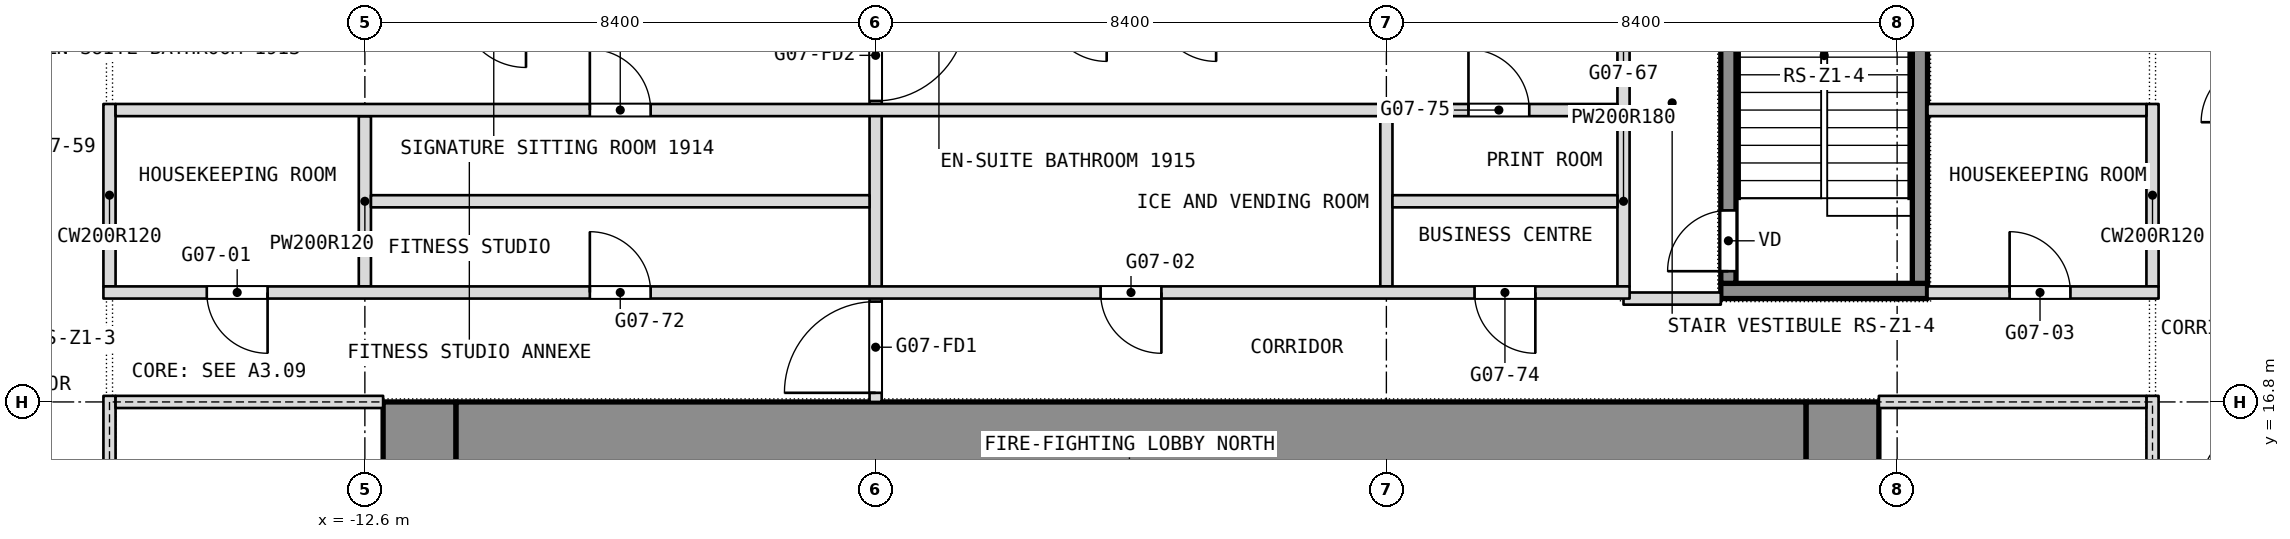
"""IFC4 building model, lengths in metres.
Left out: names, types, materials, properties, quantities, classifications, styles, units other than length and angle.
Written with IfcOpenShell. Run it as: python <this file> out.ifc"""

import sys

from ifc_helpers import new_model, si_unit, direction, frame, frame_2d, origin, place, context, subcontext, project, spatial, rectangle, extrude, element, fill, save


model = new_model("IFC4")
c1 = context("Model", 3, precision=1e-05, world=origin(), true_north=direction((0.0, 1.0)))
c2 = subcontext(c1, "Body", "Model", "MODEL_VIEW")
j1 = project(units=[si_unit("LENGTHUNIT", "METRE"), si_unit("PLANEANGLEUNIT", "RADIAN")], contexts=[c1])
p1 = place(None, origin())
s1 = spatial("IfcSite", under=j1, at=p1, CompositionType="ELEMENT")
p2 = place(p1, origin())
s2 = spatial("IfcBuilding", under=s1, at=p2, CompositionType="ELEMENT")
p3 = place(p2, frame((0.0, 0.0, 83.3)))
s3 = spatial("IfcBuildingStorey", under=s2, at=p3, CompositionType="ELEMENT", Elevation=83.3)
p4 = place(p3, frame((11.7, 0.0, 0.0), z_axis=(0.0, 0.0, 1.0), x_axis=(0.0, 1.0, 0.0)))
e1 = element("IfcWall", 1, at=p4, inside=s3, PredefinedType="SHEAR", context=c2, shape_type="SweptSolid", body=[
    extrude(rectangle(XDim=16.8, YDim=1.2, at=frame_2d((8.4, 0.0))), origin(), (0.0, 0.0, 1.0), 3.6),
])
p5 = place(p4, frame((3.6, 0.0, 0.0)))
e2 = element("IfcOpeningElement", 2, at=p5, cuts=e1, PredefinedType="OPENING", context=c2, shape_type="SweptSolid", body=[
    extrude(rectangle(XDim=0.9, YDim=2.1, at=frame_2d((0.45, 1.05))), frame((0.0, 0.6, 0.0), z_axis=(0.0, -1.0, 0.0), x_axis=(1.0, 0.0, 0.0)), (0.0, 0.0, 1.0), 1.2),
])
p6 = place(p4, frame((6.825, 0.0, 0.0)))
e3 = element("IfcOpeningElement", 3, at=p6, cuts=e1, PredefinedType="OPENING", context=c2, shape_type="SweptSolid", body=[
    extrude(rectangle(XDim=1.2, YDim=2.1, at=frame_2d((0.6, 1.05))), frame((0.0, 0.6, 0.0), z_axis=(0.0, -1.0, 0.0), x_axis=(1.0, 0.0, 0.0)), (0.0, 0.0, 1.0), 1.2),
])
p7 = place(p4, frame((14.212, 0.0, 0.0)))
e4 = element("IfcOpeningElement", 4, at=p7, cuts=e1, PredefinedType="OPENING", context=c2, shape_type="SweptSolid", body=[
    extrude(rectangle(XDim=0.9, YDim=2.1, at=frame_2d((0.45, 1.05))), frame((0.0, 0.6, 0.0), z_axis=(0.0, -1.0, 0.0), x_axis=(1.0, 0.0, 0.0)), (0.0, 0.0, 1.0), 1.2),
])
p8 = place(p4, frame((11.587, 0.0, 0.0)))
e5 = element("IfcOpeningElement", 5, at=p8, cuts=e1, PredefinedType="OPENING", context=c2, shape_type="SweptSolid", body=[
    extrude(rectangle(XDim=0.9, YDim=2.1, at=frame_2d((0.45, 1.05))), frame((0.0, 0.6, 0.0), z_axis=(0.0, -1.0, 0.0), x_axis=(1.0, 0.0, 0.0)), (0.0, 0.0, 1.0), 1.2),
])
p9 = place(p4, frame((8.775, 0.0, 0.0)))
e6 = element("IfcOpeningElement", 6, at=p9, cuts=e1, PredefinedType="OPENING", context=c2, shape_type="SweptSolid", body=[
    extrude(rectangle(XDim=1.2, YDim=2.1, at=frame_2d((0.6, 1.05))), frame((0.0, 0.6, 0.0), z_axis=(0.0, -1.0, 0.0), x_axis=(1.0, 0.0, 0.0)), (0.0, 0.0, 1.0), 1.2),
])
p10 = place(p3, frame((-11.7, 0.0, 0.0), z_axis=(0.0, 0.0, 1.0), x_axis=(0.0, 1.0, 0.0)))
e7 = element("IfcWall", 7, at=p10, inside=s3, PredefinedType="SHEAR", context=c2, shape_type="SweptSolid", body=[
    extrude(rectangle(XDim=16.8, YDim=1.2, at=frame_2d((8.4, 0.0))), origin(), (0.0, 0.0, 1.0), 3.6),
])
p11 = place(p10, frame((2.3, 0.0, 0.0)))
e8 = element("IfcOpeningElement", 8, at=p11, cuts=e7, PredefinedType="OPENING", context=c2, shape_type="SweptSolid", body=[
    extrude(rectangle(XDim=1.1, YDim=2.1, at=frame_2d((0.55, 1.05))), frame((0.0, 0.6, 0.0), z_axis=(0.0, -1.0, 0.0), x_axis=(1.0, 0.0, 0.0)), (0.0, 0.0, 1.0), 1.2),
])
p12 = place(p10, frame((4.85, 0.0, 0.0)))
e9 = element("IfcOpeningElement", 9, at=p12, cuts=e7, PredefinedType="OPENING", context=c2, shape_type="SweptSolid", body=[
    extrude(rectangle(XDim=1.1, YDim=2.1, at=frame_2d((0.55, 1.05))), frame((0.0, 0.6, 0.0), z_axis=(0.0, -1.0, 0.0), x_axis=(1.0, 0.0, 0.0)), (0.0, 0.0, 1.0), 1.2),
])
p13 = place(p10, frame((6.825, 0.0, 0.0)))
e10 = element("IfcOpeningElement", 10, at=p13, cuts=e7, PredefinedType="OPENING", context=c2, shape_type="SweptSolid", body=[
    extrude(rectangle(XDim=1.2, YDim=2.1, at=frame_2d((0.6, 1.05))), frame((0.0, 0.6, 0.0), z_axis=(0.0, -1.0, 0.0), x_axis=(1.0, 0.0, 0.0)), (0.0, 0.0, 1.0), 1.2),
])
p14 = place(p10, frame((13.4, 0.0, 0.0)))
e11 = element("IfcOpeningElement", 11, at=p14, cuts=e7, PredefinedType="OPENING", context=c2, shape_type="SweptSolid", body=[
    extrude(rectangle(XDim=1.1, YDim=2.1, at=frame_2d((0.55, 1.05))), frame((0.0, 0.6, 0.0), z_axis=(0.0, -1.0, 0.0), x_axis=(1.0, 0.0, 0.0)), (0.0, 0.0, 1.0), 1.2),
])
p15 = place(p10, frame((10.85, 0.0, 0.0)))
e12 = element("IfcOpeningElement", 12, at=p15, cuts=e7, PredefinedType="OPENING", context=c2, shape_type="SweptSolid", body=[
    extrude(rectangle(XDim=1.1, YDim=2.1, at=frame_2d((0.55, 1.05))), frame((0.0, 0.6, 0.0), z_axis=(0.0, -1.0, 0.0), x_axis=(1.0, 0.0, 0.0)), (0.0, 0.0, 1.0), 1.2),
])
p16 = place(p10, frame((8.775, 0.0, 0.0)))
e13 = element("IfcOpeningElement", 13, at=p16, cuts=e7, PredefinedType="OPENING", context=c2, shape_type="SweptSolid", body=[
    extrude(rectangle(XDim=1.2, YDim=2.1, at=frame_2d((0.6, 1.05))), frame((0.0, 0.6, 0.0), z_axis=(0.0, -1.0, 0.0), x_axis=(1.0, 0.0, 0.0)), (0.0, 0.0, 1.0), 1.2),
])
p17 = place(p3, frame((-11.1, 16.2, 0.0), z_axis=(0.0, 0.0, 1.0), x_axis=(1.0, 0.0, 0.0)))
e14 = element("IfcWall", 14, at=p17, inside=s3, PredefinedType="SHEAR", context=c2, shape_type="SweptSolid", body=[
    extrude(rectangle(XDim=22.2, YDim=1.2, at=frame_2d((11.1, 0.0))), origin(), (0.0, 0.0, 1.0), 3.6),
])
p18 = place(p3, frame((16.8, 18.7, 0.0), z_axis=(0.0, 0.0, 1.0), x_axis=(0.0, 1.0, 0.0)))
e15 = element("IfcWall", 15, at=p18, inside=s3, PredefinedType="PARTITIONING", context=c2, shape_type="SweptSolid", body=[
    extrude(rectangle(XDim=3.0, YDim=0.2, at=frame_2d((1.5, 0.0))), origin(), (0.0, 0.0, 1.0), 3.3),
])
p19 = place(p3, frame((8.1, 18.7, 0.0), z_axis=(0.0, 0.0, 1.0), x_axis=(0.0, 1.0, 0.0)))
e16 = element("IfcWall", 16, at=p19, inside=s3, PredefinedType="PARTITIONING", context=c2, shape_type="SweptSolid", body=[
    extrude(rectangle(XDim=2.8, YDim=0.2, at=frame_2d((1.4, 0.0))), origin(), (0.0, 0.0, 1.0), 3.3),
])
p20 = place(p3, frame((8.1, 21.5, 0.0), z_axis=(0.0, 0.0, 1.0), x_axis=(0.0, 1.0, 0.0)))
e17 = element("IfcWall", 17, at=p20, inside=s3, PredefinedType="PARTITIONING", context=c2, shape_type="SweptSolid", body=[
    extrude(rectangle(XDim=3.1, YDim=0.2, at=frame_2d((1.55, 0.0))), origin(), (0.0, 0.0, 1.0), 3.3),
])
p21 = place(p20, frame((2.05, 0.0, 0.0)))
e18 = element("IfcOpeningElement", 18, at=p21, cuts=e17, PredefinedType="OPENING", context=c2, shape_type="SweptSolid", body=[
    extrude(rectangle(XDim=0.9, YDim=2.1, at=frame_2d((0.45, 1.05))), frame((0.0, 0.1, 0.0), z_axis=(0.0, -1.0, 0.0), x_axis=(1.0, 0.0, 0.0)), (0.0, 0.0, 1.0), 0.2),
])
p22 = place(p3, frame((4.2, 18.7, 0.0), z_axis=(0.0, 0.0, 1.0), x_axis=(0.0, 1.0, 0.0)))
e19 = element("IfcWall", 19, at=p22, inside=s3, PredefinedType="PARTITIONING", context=c2, shape_type="SweptSolid", body=[
    extrude(rectangle(XDim=2.8, YDim=0.2, at=frame_2d((1.4, 0.0))), origin(), (0.0, 0.0, 1.0), 3.3),
])
p23 = place(p3, frame((-4.2, 16.8, 0.0), z_axis=(0.0, 0.0, 1.0), x_axis=(0.0, 1.0, 0.0)))
e20 = element("IfcWall", 20, at=p23, inside=s3, PredefinedType="PARTITIONING", context=c2, shape_type="SweptSolid", body=[
    extrude(rectangle(XDim=6.7, YDim=0.2, at=frame_2d((3.35, 0.0))), origin(), (0.0, 0.0, 1.0), 3.3),
])
p24 = place(p23, frame((0.15, 0.0, 0.0)))
e21 = element("IfcOpeningElement", 21, at=p24, cuts=e20, PredefinedType="OPENING", context=c2, shape_type="SweptSolid", body=[
    extrude(rectangle(XDim=1.5, YDim=2.1, at=frame_2d((0.75, 1.05))), frame((0.0, 0.1, 0.0), z_axis=(0.0, -1.0, 0.0), x_axis=(1.0, 0.0, 0.0)), (0.0, 0.0, 1.0), 0.2),
])
p25 = place(p23, frame((4.95, 0.0, 0.0)))
e22 = element("IfcOpeningElement", 22, at=p25, cuts=e20, PredefinedType="OPENING", context=c2, shape_type="SweptSolid", body=[
    extrude(rectangle(XDim=1.5, YDim=2.1, at=frame_2d((0.75, 1.05))), frame((0.0, 0.1, 0.0), z_axis=(0.0, -1.0, 0.0), x_axis=(1.0, 0.0, 0.0)), (0.0, 0.0, 1.0), 0.2),
])
p26 = place(p3, frame((-12.6, 18.7, 0.0), z_axis=(0.0, 0.0, 1.0), x_axis=(0.0, 1.0, 0.0)))
e23 = element("IfcWall", 23, at=p26, inside=s3, PredefinedType="PARTITIONING", context=c2, shape_type="SweptSolid", body=[
    extrude(rectangle(XDim=2.8, YDim=0.2, at=frame_2d((1.4, 0.0))), origin(), (0.0, 0.0, 1.0), 3.3),
])
p27 = place(p3, frame((-16.8, 18.7, 0.0), z_axis=(0.0, 0.0, 1.0), x_axis=(0.0, 1.0, 0.0)))
e24 = element("IfcWall", 24, at=p27, inside=s3, PredefinedType="PARTITIONING", context=c2, shape_type="SweptSolid", body=[
    extrude(rectangle(XDim=3.0, YDim=0.2, at=frame_2d((1.5, 0.0))), origin(), (0.0, 0.0, 1.0), 3.3),
])
p28 = place(p3, frame((8.1, 18.5, 0.0), z_axis=(0.0, 0.0, 1.0), x_axis=(1.0, 0.0, 0.0)))
e25 = element("IfcWall", 25, at=p28, inside=s3, PredefinedType="PARTITIONING", context=c2, shape_type="SweptSolid", body=[
    extrude(rectangle(XDim=1.6, YDim=0.2, at=frame_2d((0.8, 0.0))), origin(), (0.0, 0.0, 1.0), 3.3),
])
p29 = place(p3, frame((-16.9, 18.6, 0.0), z_axis=(0.0, 0.0, 1.0), x_axis=(1.0, 0.0, 0.0)))
e26 = element("IfcWall", 26, at=p29, inside=s3, PredefinedType="PARTITIONING", context=c2, shape_type="SweptSolid", body=[
    extrude(rectangle(XDim=25.1, YDim=0.2, at=frame_2d((12.55, 0.0))), origin(), (0.0, 0.0, 1.0), 3.3),
])
p30 = place(p29, frame((1.7, 0.0, 0.0)))
e27 = element("IfcOpeningElement", 27, at=p30, cuts=e26, PredefinedType="OPENING", context=c2, shape_type="SweptSolid", body=[
    extrude(rectangle(XDim=1.0, YDim=2.1, at=frame_2d((0.5, 1.05))), frame((0.0, 0.1, 0.0), z_axis=(0.0, -1.0, 0.0), x_axis=(1.0, 0.0, 0.0)), (0.0, 0.0, 1.0), 0.2),
])
p31 = place(p29, frame((16.4, 0.0, 0.0)))
e28 = element("IfcOpeningElement", 28, at=p31, cuts=e26, PredefinedType="OPENING", context=c2, shape_type="SweptSolid", body=[
    extrude(rectangle(XDim=1.0, YDim=2.1, at=frame_2d((0.5, 1.05))), frame((0.0, 0.1, 0.0), z_axis=(0.0, -1.0, 0.0), x_axis=(1.0, 0.0, 0.0)), (0.0, 0.0, 1.0), 0.2),
])
p32 = place(p29, frame((8.0, 0.0, 0.0)))
e29 = element("IfcOpeningElement", 29, at=p32, cuts=e26, PredefinedType="OPENING", context=c2, shape_type="SweptSolid", body=[
    extrude(rectangle(XDim=1.0, YDim=2.1, at=frame_2d((0.5, 1.05))), frame((0.0, 0.1, 0.0), z_axis=(0.0, -1.0, 0.0), x_axis=(1.0, 0.0, 0.0)), (0.0, 0.0, 1.0), 0.2),
])
p33 = place(p29, frame((22.55, 0.0, 0.0)))
e30 = element("IfcOpeningElement", 30, at=p33, cuts=e26, PredefinedType="OPENING", context=c2, shape_type="SweptSolid", body=[
    extrude(rectangle(XDim=1.0, YDim=2.1, at=frame_2d((0.5, 1.05))), frame((0.0, 0.1, 0.0), z_axis=(0.0, -1.0, 0.0), x_axis=(1.0, 0.0, 0.0)), (0.0, 0.0, 1.0), 0.2),
])
p34 = place(p3, frame((13.1, 18.6, 0.0), z_axis=(0.0, 0.0, 1.0), x_axis=(1.0, 0.0, 0.0)))
e31 = element("IfcWall", 31, at=p34, inside=s3, PredefinedType="PARTITIONING", context=c2, shape_type="SweptSolid", body=[
    extrude(rectangle(XDim=3.8, YDim=0.2, at=frame_2d((1.9, 0.0))), origin(), (0.0, 0.0, 1.0), 3.3),
])
p35 = place(p34, frame((1.35, 0.0, 0.0)))
e32 = element("IfcOpeningElement", 32, at=p35, cuts=e31, PredefinedType="OPENING", context=c2, shape_type="SweptSolid", body=[
    extrude(rectangle(XDim=1.0, YDim=2.1, at=frame_2d((0.5, 1.05))), frame((0.0, 0.1, 0.0), z_axis=(0.0, -1.0, 0.0), x_axis=(1.0, 0.0, 0.0)), (0.0, 0.0, 1.0), 0.2),
])
p36 = place(p3, frame((-12.5, 20.1, 0.0), z_axis=(0.0, 0.0, 1.0), x_axis=(1.0, 0.0, 0.0)))
e33 = element("IfcWall", 33, at=p36, inside=s3, PredefinedType="PARTITIONING", context=c2, shape_type="SweptSolid", body=[
    extrude(rectangle(XDim=8.2, YDim=0.2, at=frame_2d((4.1, 0.0))), origin(), (0.0, 0.0, 1.0), 3.3),
])
p37 = place(p3, frame((4.3, 20.1, 0.0), z_axis=(0.0, 0.0, 1.0), x_axis=(1.0, 0.0, 0.0)))
e34 = element("IfcWall", 34, at=p37, inside=s3, PredefinedType="PARTITIONING", context=c2, shape_type="SweptSolid", body=[
    extrude(rectangle(XDim=3.7, YDim=0.2, at=frame_2d((1.85, 0.0))), origin(), (0.0, 0.0, 1.0), 3.3),
])
p38 = place(p3, frame((-16.7, 21.6, 0.0), z_axis=(0.0, 0.0, 1.0), x_axis=(1.0, 0.0, 0.0)))
e35 = element("IfcWall", 35, at=p38, inside=s3, PredefinedType="PARTITIONING", context=c2, shape_type="SweptSolid", body=[
    extrude(rectangle(XDim=24.7, YDim=0.2, at=frame_2d((12.35, 0.0))), origin(), (0.0, 0.0, 1.0), 3.3),
])
p39 = place(p38, frame((7.8, 0.0, 0.0)))
e36 = element("IfcOpeningElement", 36, at=p39, cuts=e35, PredefinedType="OPENING", context=c2, shape_type="SweptSolid", body=[
    extrude(rectangle(XDim=1.0, YDim=2.1, at=frame_2d((0.5, 1.05))), frame((0.0, 0.1, 0.0), z_axis=(0.0, -1.0, 0.0), x_axis=(1.0, 0.0, 0.0)), (0.0, 0.0, 1.0), 0.2),
])
p40 = place(p38, frame((22.25, 0.0, 0.0)))
e37 = element("IfcOpeningElement", 37, at=p40, cuts=e35, PredefinedType="OPENING", context=c2, shape_type="SweptSolid", body=[
    extrude(rectangle(XDim=1.0, YDim=2.1, at=frame_2d((0.5, 1.05))), frame((0.0, 0.1, 0.0), z_axis=(0.0, -1.0, 0.0), x_axis=(1.0, 0.0, 0.0)), (0.0, 0.0, 1.0), 0.2),
])
p41 = place(p3, frame((13.1, 21.6, 0.0), z_axis=(0.0, 0.0, 1.0), x_axis=(1.0, 0.0, 0.0)))
e38 = element("IfcWall", 38, at=p41, inside=s3, PredefinedType="PARTITIONING", context=c2, shape_type="SweptSolid", body=[
    extrude(rectangle(XDim=3.6, YDim=0.2, at=frame_2d((1.8, 0.0))), origin(), (0.0, 0.0, 1.0), 3.3),
])
p42 = place(p3, frame((-16.8, -0.1, 0.0), z_axis=(0.0, 0.0, 1.0), x_axis=(0.0, 1.0, 0.0)))
e39 = element("IfcWall", 39, at=p42, inside=s3, PredefinedType="PARTITIONING", context=c2, shape_type="SweptSolid", body=[
    extrude(rectangle(XDim=17.0, YDim=0.2, at=frame_2d((8.5, 0.0))), origin(), (0.0, 0.0, 1.0), 3.3),
])
p43 = place(p42, frame((2.2, 0.0, 0.0)))
e40 = element("IfcOpeningElement", 40, at=p43, cuts=e39, PredefinedType="OPENING", context=c2, shape_type="SweptSolid", body=[
    extrude(rectangle(XDim=1.8, YDim=2.1, at=frame_2d((0.9, 1.05))), frame((0.0, 0.1, 0.0), z_axis=(0.0, -1.0, 0.0), x_axis=(1.0, 0.0, 0.0)), (0.0, 0.0, 1.0), 0.2),
])
p44 = place(p42, frame((7.2, 0.0, 0.0)))
e41 = element("IfcOpeningElement", 41, at=p44, cuts=e39, PredefinedType="OPENING", context=c2, shape_type="SweptSolid", body=[
    extrude(rectangle(XDim=1.8, YDim=2.1, at=frame_2d((0.9, 1.05))), frame((0.0, 0.1, 0.0), z_axis=(0.0, -1.0, 0.0), x_axis=(1.0, 0.0, 0.0)), (0.0, 0.0, 1.0), 0.2),
])
p45 = place(p3, frame((-16.7, 16.8, 0.0), z_axis=(0.0, 0.0, 1.0), x_axis=(1.0, 0.0, 0.0)))
e42 = element("IfcWall", 42, at=p45, inside=s3, PredefinedType="PARTITIONING", context=c2, shape_type="SweptSolid", body=[
    extrude(rectangle(XDim=4.4, YDim=0.2, at=frame_2d((2.2, 0.0))), origin(), (0.0, 0.0, 1.0), 2.8),
])
p46 = place(p3, frame((16.8, -0.1, 0.0), z_axis=(0.0, 0.0, 1.0), x_axis=(0.0, 1.0, 0.0)))
e43 = element("IfcWall", 43, at=p46, inside=s3, PredefinedType="PARTITIONING", context=c2, shape_type="SweptSolid", body=[
    extrude(rectangle(XDim=17.0, YDim=0.2, at=frame_2d((8.5, 0.0))), origin(), (0.0, 0.0, 1.0), 3.3),
])
p47 = place(p46, frame((2.2, 0.0, 0.0)))
e44 = element("IfcOpeningElement", 44, at=p47, cuts=e43, PredefinedType="OPENING", context=c2, shape_type="SweptSolid", body=[
    extrude(rectangle(XDim=1.8, YDim=2.1, at=frame_2d((0.9, 1.05))), frame((0.0, 0.1, 0.0), z_axis=(0.0, -1.0, 0.0), x_axis=(1.0, 0.0, 0.0)), (0.0, 0.0, 1.0), 0.2),
])
p48 = place(p46, frame((13.0, 0.0, 0.0)))
e45 = element("IfcOpeningElement", 45, at=p48, cuts=e43, PredefinedType="OPENING", context=c2, shape_type="SweptSolid", body=[
    extrude(rectangle(XDim=1.8, YDim=2.1, at=frame_2d((0.9, 1.05))), frame((0.0, 0.1, 0.0), z_axis=(0.0, -1.0, 0.0), x_axis=(1.0, 0.0, 0.0)), (0.0, 0.0, 1.0), 0.2),
])
p49 = place(p3, frame((12.3, 16.8, 0.0), z_axis=(0.0, 0.0, 1.0), x_axis=(1.0, 0.0, 0.0)))
e46 = element("IfcWall", 46, at=p49, inside=s3, PredefinedType="PARTITIONING", context=c2, shape_type="SweptSolid", body=[
    extrude(rectangle(XDim=4.4, YDim=0.2, at=frame_2d((2.2, 0.0))), origin(), (0.0, 0.0, 1.0), 2.8),
])
p50 = place(p3, frame((9.7, 18.625, 0.1), z_axis=(0.0, 0.0, 1.0), x_axis=(1.0, 0.0, 0.0)))
e47 = element("IfcWall", 47, at=p50, inside=s3, PredefinedType="SHEAR", context=c2, shape_type="SweptSolid", body=[
    extrude(rectangle(XDim=3.4, YDim=0.25, at=frame_2d((1.7, 0.0))), origin(), (0.0, 0.0, 1.0), 3.6),
])
p51 = place(p3, frame((9.825, 18.75, 0.1), z_axis=(0.0, 0.0, 1.0), x_axis=(0.0, 1.0, 0.0)))
e48 = element("IfcWall", 48, at=p51, inside=s3, PredefinedType="SHEAR", context=c2, shape_type="SweptSolid", body=[
    extrude(rectangle(XDim=5.7, YDim=0.25, at=frame_2d((2.85, 0.0))), origin(), (0.0, 0.0, 1.0), 3.6),
])
p52 = place(p51, frame((0.2, 0.0, 0.0)))
e49 = element("IfcOpeningElement", 49, at=p52, cuts=e48, PredefinedType="OPENING", context=c2, shape_type="SweptSolid", body=[
    extrude(rectangle(XDim=1.0, YDim=2.1, at=frame_2d((0.5, 1.05))), frame((0.0, 0.125, 0.0), z_axis=(0.0, -1.0, 0.0), x_axis=(1.0, 0.0, 0.0)), (0.0, 0.0, 1.0), 0.25),
])
p53 = place(p3, frame((12.975, 18.75, 0.1), z_axis=(0.0, 0.0, 1.0), x_axis=(0.0, 1.0, 0.0)))
e50 = element("IfcWall", 50, at=p53, inside=s3, PredefinedType="SHEAR", context=c2, shape_type="SweptSolid", body=[
    extrude(rectangle(XDim=5.7, YDim=0.25, at=frame_2d((2.85, 0.0))), origin(), (0.0, 0.0, 1.0), 3.6),
])
p54 = place(p30, origin())
e51 = element("IfcDoor", 51, at=p54, inside=s3, OperationType="SINGLE_SWING_RIGHT", PredefinedType="DOOR", context=c2, shape_type="SweptSolid", body=[
    extrude(rectangle(XDim=1.0, YDim=2.1, at=frame_2d((0.5, 1.05))), frame((0.0, 0.025, 0.0), z_axis=(0.0, -1.0, 0.0), x_axis=(1.0, 0.0, 0.0)), (0.0, 0.0, 1.0), 0.05),
])
fill(e27, e51)
p55 = place(p31, origin())
e52 = element("IfcDoor", 52, at=p55, inside=s3, OperationType="SINGLE_SWING_LEFT", PredefinedType="DOOR", context=c2, shape_type="SweptSolid", body=[
    extrude(rectangle(XDim=1.0, YDim=2.1, at=frame_2d((0.5, 1.05))), frame((0.0, 0.025, 0.0), z_axis=(0.0, -1.0, 0.0), x_axis=(1.0, 0.0, 0.0)), (0.0, 0.0, 1.0), 0.05),
])
fill(e28, e52)
p56 = place(p32, origin())
e53 = element("IfcDoor", 53, at=p56, inside=s3, OperationType="SINGLE_SWING_RIGHT", PredefinedType="DOOR", context=c2, shape_type="SweptSolid", body=[
    extrude(rectangle(XDim=1.0, YDim=2.1, at=frame_2d((0.5, 1.05))), frame((0.0, 0.025, 0.0), z_axis=(0.0, -1.0, 0.0), x_axis=(1.0, 0.0, 0.0)), (0.0, 0.0, 1.0), 0.05),
])
fill(e29, e53)
p57 = place(p33, origin())
e54 = element("IfcDoor", 54, at=p57, inside=s3, OperationType="SINGLE_SWING_RIGHT", PredefinedType="DOOR", context=c2, shape_type="SweptSolid", body=[
    extrude(rectangle(XDim=1.0, YDim=2.1, at=frame_2d((0.5, 1.05))), frame((0.0, 0.025, 0.0), z_axis=(0.0, -1.0, 0.0), x_axis=(1.0, 0.0, 0.0)), (0.0, 0.0, 1.0), 0.05),
])
fill(e30, e54)
p58 = place(p35, origin())
e55 = element("IfcDoor", 55, at=p58, inside=s3, OperationType="SINGLE_SWING_RIGHT", PredefinedType="DOOR", context=c2, shape_type="SweptSolid", body=[
    extrude(rectangle(XDim=1.0, YDim=2.1, at=frame_2d((0.5, 1.05))), frame((0.0, 0.025, 0.0), z_axis=(0.0, -1.0, 0.0), x_axis=(1.0, 0.0, 0.0)), (0.0, 0.0, 1.0), 0.05),
])
fill(e32, e55)
p59 = place(p39, origin())
e56 = element("IfcDoor", 56, at=p59, inside=s3, OperationType="SINGLE_SWING_RIGHT", PredefinedType="DOOR", context=c2, shape_type="SweptSolid", body=[
    extrude(rectangle(XDim=1.0, YDim=2.1, at=frame_2d((0.5, 1.05))), frame((0.0, 0.025, 0.0), z_axis=(0.0, -1.0, 0.0), x_axis=(1.0, 0.0, 0.0)), (0.0, 0.0, 1.0), 0.05),
])
fill(e36, e56)
p60 = place(p40, origin())
e57 = element("IfcDoor", 57, at=p60, inside=s3, OperationType="SINGLE_SWING_LEFT", PredefinedType="DOOR", context=c2, shape_type="SweptSolid", body=[
    extrude(rectangle(XDim=1.0, YDim=2.1, at=frame_2d((0.5, 1.05))), frame((0.0, 0.025, 0.0), z_axis=(0.0, -1.0, 0.0), x_axis=(1.0, 0.0, 0.0)), (0.0, 0.0, 1.0), 0.05),
])
fill(e37, e57)
p61 = place(p52, origin())
e58 = element("IfcDoor", 58, at=p61, inside=s3, OperationType="SINGLE_SWING_LEFT", PredefinedType="DOOR", context=c2, shape_type="SweptSolid", body=[
    extrude(rectangle(XDim=1.0, YDim=2.1, at=frame_2d((0.5, 1.05))), frame((0.0, 0.025, 0.0), z_axis=(0.0, -1.0, 0.0), x_axis=(1.0, 0.0, 0.0)), (0.0, 0.0, 1.0), 0.05),
])
fill(e49, e58)
p62 = place(p24, origin())
e59 = element("IfcDoor", 59, at=p62, inside=s3, OperationType="DOUBLE_DOOR_DOUBLE_SWING", PredefinedType="DOOR", context=c2, shape_type="SweptSolid", body=[
    extrude(rectangle(XDim=1.5, YDim=2.1, at=frame_2d((0.75, 1.05))), frame((0.0, 0.025, 0.0), z_axis=(0.0, -1.0, 0.0), x_axis=(1.0, 0.0, 0.0)), (0.0, 0.0, 1.0), 0.05),
])
fill(e21, e59)
p63 = place(p25, origin())
e60 = element("IfcDoor", 60, at=p63, inside=s3, OperationType="DOUBLE_DOOR_DOUBLE_SWING", PredefinedType="DOOR", context=c2, shape_type="SweptSolid", body=[
    extrude(rectangle(XDim=1.5, YDim=2.1, at=frame_2d((0.75, 1.05))), frame((0.0, 0.025, 0.0), z_axis=(0.0, -1.0, 0.0), x_axis=(1.0, 0.0, 0.0)), (0.0, 0.0, 1.0), 0.05),
])
fill(e22, e60)
save(model, sys.argv[1])
